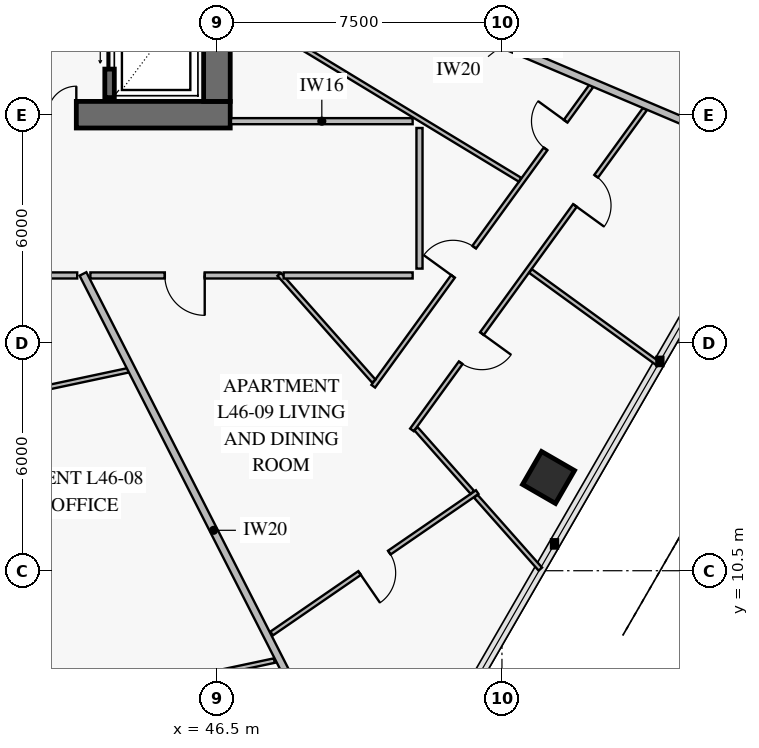
"""IFC4 building model, lengths in metres.
Left out: names, types, materials, properties, quantities, classifications, styles, units other than length and angle.
Written with IfcOpenShell. Run it as: python <this file> out.ifc"""

import sys

from ifc_helpers import new_model, si_unit, direction, frame, frame_2d, origin, origin_2d, place, context, subcontext, project, spatial, rectangle, extrude, element, fill, save


model = new_model("IFC4")
c1 = context("Model", 3, precision=1e-05, world=origin(), true_north=direction((0.0, 1.0)))
c2 = subcontext(c1, "Body", "Model", "MODEL_VIEW")
j1 = project(units=[si_unit("LENGTHUNIT", "METRE"), si_unit("PLANEANGLEUNIT", "RADIAN")], contexts=[c1])
p1 = place(None, origin())
s1 = spatial("IfcSite", under=j1, at=p1, CompositionType="ELEMENT")
p2 = place(p1, origin())
s2 = spatial("IfcBuilding", under=s1, at=p2, CompositionType="ELEMENT")
p3 = place(p2, frame((0.0, 0.0, 184.6)))
s3 = spatial("IfcBuildingStorey", under=s2, at=p3, CompositionType="ELEMENT", Elevation=184.6)
p4 = place(p3, frame((37.35, 22.5, 0.0), z_axis=(0.0, 0.0, 1.0), x_axis=(1.0, 0.0, 0.0)))
e1 = element("IfcWall", 1, at=p4, inside=s3, PredefinedType="SHEAR", context=c2, shape_type="SweptSolid", body=[
    extrude(rectangle(XDim=9.5, YDim=0.7, at=frame_2d((4.75, 0.0))), origin(), (0.0, 0.0, 1.0), 3.8),
])
p5 = place(p4, frame((3.95, 0.0, 0.0)))
e2 = element("IfcOpeningElement", 2, at=p5, cuts=e1, PredefinedType="OPENING", context=c2, shape_type="SweptSolid", body=[
    extrude(rectangle(XDim=1.5, YDim=2.15, at=frame_2d((0.75, 1.075))), frame((0.0, 0.362, 0.0), z_axis=(0.0, -1.0, 0.0), x_axis=(1.0, 0.0, 0.0)), (0.0, 0.0, 1.0), 0.724),
])
p6 = place(p3, frame((46.5, 22.85, 0.0), z_axis=(0.0, 0.0, 1.0), x_axis=(0.0, 1.0, 0.0)))
e3 = element("IfcWall", 3, at=p6, inside=s3, PredefinedType="SHEAR", context=c2, shape_type="SweptSolid", body=[
    extrude(rectangle(XDim=18.3, YDim=0.7, at=frame_2d((9.15, 0.0))), origin(), (0.0, 0.0, 1.0), 3.8),
])
p7 = place(p6, frame((8.9, 0.0, 0.0)))
e4 = element("IfcOpeningElement", 4, at=p7, cuts=e3, PredefinedType="OPENING", context=c2, shape_type="SweptSolid", body=[
    extrude(rectangle(XDim=1.1, YDim=2.15, at=frame_2d((0.55, 1.075))), frame((0.0, 0.362, 0.0), z_axis=(0.0, -1.0, 0.0), x_axis=(1.0, 0.0, 0.0)), (0.0, 0.0, 1.0), 0.724),
])
p8 = place(p3, frame((55.226, 12.953, 0.0), z_axis=(0.0, 0.0, 1.0), x_axis=(0.5, 0.866025403784, 0.0)))
e5 = element("IfcColumn", 5, at=p8, inside=s3, PredefinedType="COLUMN", context=c2, shape_type="SweptSolid", body=[
    extrude(rectangle(XDim=1.0, YDim=1.0, at=origin_2d()), origin(), (0.0, 0.0, 1.0), 3.55),
])
p9 = place(p3, frame((43.675, 22.95, 0.0), z_axis=(0.0, 0.0, 1.0), x_axis=(0.0, 1.0, 0.0)))
e6 = element("IfcWall", 6, at=p9, inside=s3, PredefinedType="SOLIDWALL", context=c2, shape_type="SweptSolid", body=[
    extrude(rectangle(XDim=8.2, YDim=0.25, at=frame_2d((4.1, 0.0))), origin(), (0.0, 0.0, 1.0), 3.8),
])
p10 = place(p9, frame((0.75, 0.0, 0.0)))
e7 = element("IfcOpeningElement", 7, at=p10, cuts=e6, PredefinedType="OPENING", context=c2, shape_type="SweptSolid", body=[
    extrude(rectangle(XDim=1.3, YDim=2.3, at=frame_2d((0.65, 1.15))), frame((0.0, 0.137, 0.0), z_axis=(0.0, -1.0, 0.0), x_axis=(1.0, 0.0, 0.0)), (0.0, 0.0, 1.0), 0.274),
])
p11 = place(p9, frame((3.7, 0.0, 0.0)))
e8 = element("IfcOpeningElement", 8, at=p11, cuts=e6, PredefinedType="OPENING", context=c2, shape_type="SweptSolid", body=[
    extrude(rectangle(XDim=1.3, YDim=2.3, at=frame_2d((0.65, 1.15))), frame((0.0, 0.137, 0.0), z_axis=(0.0, -1.0, 0.0), x_axis=(1.0, 0.0, 0.0)), (0.0, 0.0, 1.0), 0.274),
])
p12 = place(p9, frame((6.62, 0.0, 0.0)))
e9 = element("IfcOpeningElement", 9, at=p12, cuts=e6, PredefinedType="OPENING", context=c2, shape_type="SweptSolid", body=[
    extrude(rectangle(XDim=0.9, YDim=2.1, at=frame_2d((0.45, 1.05))), frame((0.0, 0.137, 0.0), z_axis=(0.0, -1.0, 0.0), x_axis=(1.0, 0.0, 0.0)), (0.0, 0.0, 1.0), 0.274),
])
p13 = place(p3, frame((39.902, 6.412, 0.0), z_axis=(0.0, 0.0, 1.0), x_axis=(0.978148894312, 0.207905604918, 0.0)))
e10 = element("IfcWall", 10, at=p13, inside=s3, PredefinedType="PARTITIONING", context=c2, shape_type="SweptSolid", body=[
    extrude(rectangle(XDim=8.289, YDim=0.12, at=frame_2d((4.145, 0.0))), origin(), (0.0, 0.0, 1.0), 2.87),
])
p14 = place(p13, frame((3.586, 0.0, 0.0)))
e11 = element("IfcOpeningElement", 11, at=p14, cuts=e10, PredefinedType="OPENING", context=c2, shape_type="SweptSolid", body=[
    extrude(rectangle(XDim=0.95, YDim=2.1, at=frame_2d((0.475, 1.05))), frame((0.0, 0.072, 0.0), z_axis=(0.0, -1.0, 0.0), x_axis=(1.0, 0.0, 0.0)), (0.0, 0.0, 1.0), 0.144),
])
p15 = place(p3, frame((47.94, 8.847, 0.0), z_axis=(0.0, 0.0, 1.0), x_axis=(0.823925822712, 0.566697660723, 0.0)))
e12 = element("IfcWall", 12, at=p15, inside=s3, PredefinedType="PARTITIONING", context=c2, shape_type="SweptSolid", body=[
    extrude(rectangle(XDim=6.566, YDim=0.12, at=frame_2d((3.283, 0.0))), origin(), (0.0, 0.0, 1.0), 2.87),
])
p16 = place(p15, frame((2.808, 0.0, 0.0)))
e13 = element("IfcOpeningElement", 13, at=p16, cuts=e12, PredefinedType="OPENING", context=c2, shape_type="SweptSolid", body=[
    extrude(rectangle(XDim=0.95, YDim=2.1, at=frame_2d((0.475, 1.05))), frame((0.0, 0.072, 0.0), z_axis=(0.0, -1.0, 0.0), x_axis=(1.0, 0.0, 0.0)), (0.0, 0.0, 1.0), 0.144),
])
p17 = place(p3, frame((50.613, 15.355, 0.0), z_axis=(0.0, 0.0, 1.0), x_axis=(0.587519111836, 0.809210289867, 0.0)))
e14 = element("IfcWall", 14, at=p17, inside=s3, PredefinedType="PARTITIONING", context=c2, shape_type="SweptSolid", body=[
    extrude(rectangle(XDim=9.768, YDim=0.12, at=frame_2d((4.884, 0.0))), origin(), (0.0, 0.0, 1.0), 2.9),
])
p18 = place(p17, frame((3.572, 0.0, 0.0)))
e15 = element("IfcOpeningElement", 15, at=p18, cuts=e14, PredefinedType="OPENING", context=c2, shape_type="SweptSolid", body=[
    extrude(rectangle(XDim=0.95, YDim=2.1, at=frame_2d((0.475, 1.05))), frame((0.0, 0.072, 0.0), z_axis=(0.0, -1.0, 0.0), x_axis=(1.0, 0.0, 0.0)), (0.0, 0.0, 1.0), 0.144),
])
p19 = place(p17, frame((7.719, 0.0, 0.0)))
e16 = element("IfcOpeningElement", 16, at=p19, cuts=e14, PredefinedType="OPENING", context=c2, shape_type="SweptSolid", body=[
    extrude(rectangle(XDim=0.9, YDim=2.1, at=frame_2d((0.45, 1.05))), frame((0.0, 0.072, 0.0), z_axis=(0.0, -1.0, 0.0), x_axis=(1.0, 0.0, 0.0)), (0.0, 0.0, 1.0), 0.144),
])
p20 = place(p3, frame((51.632, 14.205, 0.0), z_axis=(0.0, 0.0, 1.0), x_axis=(0.587503568884, 0.809221574446, 0.0)))
e17 = element("IfcWall", 17, at=p20, inside=s3, PredefinedType="PARTITIONING", context=c2, shape_type="SweptSolid", body=[
    extrude(rectangle(XDim=10.432, YDim=0.12, at=frame_2d((5.216, 0.0))), origin(), (0.0, 0.0, 1.0), 2.9),
])
p21 = place(p20, frame((2.183, 0.0, 0.0)))
e18 = element("IfcOpeningElement", 18, at=p21, cuts=e17, PredefinedType="OPENING", context=c2, shape_type="SweptSolid", body=[
    extrude(rectangle(XDim=0.95, YDim=2.1, at=frame_2d((0.475, 1.05))), frame((0.0, 0.072, 0.0), z_axis=(0.0, -1.0, 0.0), x_axis=(1.0, 0.0, 0.0)), (0.0, 0.0, 1.0), 0.144),
])
p22 = place(p20, frame((7.299, 0.0, 0.0)))
e19 = element("IfcOpeningElement", 19, at=p22, cuts=e17, PredefinedType="OPENING", context=c2, shape_type="SweptSolid", body=[
    extrude(rectangle(XDim=0.95, YDim=2.1, at=frame_2d((0.475, 1.05))), frame((0.0, 0.072, 0.0), z_axis=(0.0, -1.0, 0.0), x_axis=(1.0, 0.0, 0.0)), (0.0, 0.0, 1.0), 0.144),
])
p23 = place(p3, frame((43.17, 18.27, 0.0), z_axis=(0.0, 0.0, 1.0), x_axis=(1.0, 0.0, 0.0)))
e20 = element("IfcWall", 20, at=p23, inside=s3, PredefinedType="PARTITIONING", context=c2, shape_type="SweptSolid", body=[
    extrude(rectangle(XDim=4.968, YDim=0.16, at=frame_2d((2.484, 0.0))), origin(), (0.0, 0.0, 1.0), 3.55),
])
p24 = place(p23, frame((1.959, 0.0, 0.0)))
e21 = element("IfcOpeningElement", 21, at=p24, cuts=e20, PredefinedType="OPENING", context=c2, shape_type="SweptSolid", body=[
    extrude(rectangle(XDim=1.05, YDim=2.15, at=frame_2d((0.525, 1.075))), frame((0.0, 0.092, 0.0), z_axis=(0.0, -1.0, 0.0), x_axis=(1.0, 0.0, 0.0)), (0.0, 0.0, 1.0), 0.184),
])
p25 = place(p3, frame((38.674, 14.607, 0.0), z_axis=(0.0, 0.0, 1.0), x_axis=(0.978141487947, 0.207940447142, 0.0)))
e22 = element("IfcWall", 22, at=p25, inside=s3, PredefinedType="PARTITIONING", context=c2, shape_type="SweptSolid", body=[
    extrude(rectangle(XDim=5.647, YDim=0.12, at=frame_2d((2.824, 0.0))), origin(), (0.0, 0.0, 1.0), 2.9),
])
p26 = place(p3, frame((42.975, 18.31, 0.0), z_axis=(0.0, 0.0, 1.0), x_axis=(0.453997506489, -0.891002954037, 0.0)))
e23 = element("IfcWall", 23, at=p26, inside=s3, PredefinedType="PARTITIONING", context=c2, shape_type="SweptSolid", body=[
    extrude(rectangle(XDim=15.144, YDim=0.2, at=frame_2d((7.572, 0.0))), origin(), (0.0, 0.0, 1.0), 2.87),
])
p27 = place(p3, frame((46.858, 25.411, 0.0), z_axis=(0.0, 0.0, 1.0), x_axis=(0.854916867304, -0.518765023878, 0.0)))
e24 = element("IfcWall", 24, at=p27, inside=s3, PredefinedType="PARTITIONING", context=c2, shape_type="SweptSolid", body=[
    extrude(rectangle(XDim=8.909, YDim=0.12, at=frame_2d((4.455, 0.0))), origin(), (0.0, 0.0, 1.0), 3.15),
])
p28 = place(p3, frame((54.752, 18.386, 0.0), z_axis=(0.0, 0.0, 1.0), x_axis=(0.809234621537, -0.587485597531, 0.0)))
e25 = element("IfcWall", 25, at=p28, inside=s3, PredefinedType="PARTITIONING", context=c2, shape_type="SweptSolid", body=[
    extrude(rectangle(XDim=4.169, YDim=0.12, at=frame_2d((2.085, 0.0))), origin(), (0.0, 0.0, 1.0), 2.87),
])
p29 = place(p3, frame((48.138, 18.3, 0.0), z_axis=(0.0, 0.0, 1.0), x_axis=(0.663123743862, -0.748509786393, 0.0)))
e26 = element("IfcWall", 26, at=p29, inside=s3, PredefinedType="PARTITIONING", context=c2, shape_type="SweptSolid", body=[
    extrude(rectangle(XDim=3.754, YDim=0.12, at=frame_2d((1.877, 0.0))), origin(), (0.0, 0.0, 1.0), 3.55),
])
p30 = place(p3, frame((51.739, 14.236, 0.0), z_axis=(0.0, 0.0, 1.0), x_axis=(0.663176854864, -0.74846273065, 0.0)))
e27 = element("IfcWall", 27, at=p30, inside=s3, PredefinedType="PARTITIONING", context=c2, shape_type="SweptSolid", body=[
    extrude(rectangle(XDim=2.236, YDim=0.12, at=frame_2d((1.118, 0.0))), origin(), (0.0, 0.0, 1.0), 3.55),
])
p31 = place(p3, frame((53.312, 12.46, 0.0), z_axis=(0.0, 0.0, 1.0), x_axis=(0.663102409331, -0.748528686651, 0.0)))
e28 = element("IfcWall", 28, at=p31, inside=s3, PredefinedType="PARTITIONING", context=c2, shape_type="SweptSolid", body=[
    extrude(rectangle(XDim=2.561, YDim=0.12, at=frame_2d((1.28, 0.0))), origin(), (0.0, 0.0, 1.0), 2.87),
])
p32 = place(p3, frame((46.858, 27.391, 0.0), z_axis=(0.0, 0.0, 1.0), x_axis=(0.920508238271, -0.390723154261, 0.0)))
e29 = element("IfcWall", 29, at=p32, inside=s3, PredefinedType="PARTITIONING", context=c2, shape_type="SweptSolid", body=[
    extrude(rectangle(XDim=15.592, YDim=0.2, at=frame_2d((7.796, 0.0))), origin(), (0.0, 0.0, 1.0), 2.87),
])
p33 = place(p3, frame((38.126, 18.27, 0.0), z_axis=(0.0, 0.0, 1.0), x_axis=(1.0, 0.0, 0.0)))
e30 = element("IfcWall", 30, at=p33, inside=s3, PredefinedType="PARTITIONING", context=c2, shape_type="SweptSolid", body=[
    extrude(rectangle(XDim=4.698, YDim=0.16, at=frame_2d((2.349, 0.0))), origin(), (0.0, 0.0, 1.0), 2.9),
])
p34 = place(p3, frame((51.65, 22.33, 0.0), z_axis=(0.0, 0.0, 1.0), x_axis=(-1.0, 0.0, 0.0)))
e31 = element("IfcWall", 31, at=p34, inside=s3, PredefinedType="PARTITIONING", context=c2, shape_type="SweptSolid", body=[
    extrude(rectangle(XDim=4.78, YDim=0.16, at=frame_2d((2.39, 0.0))), origin(), (0.0, 0.0, 1.0), 3.55),
])
p35 = place(p3, frame((51.83, 18.45, 0.0), z_axis=(0.0, 0.0, 1.0), x_axis=(0.0, 1.0, 0.0)))
e32 = element("IfcWall", 32, at=p35, inside=s3, PredefinedType="PARTITIONING", context=c2, shape_type="SweptSolid", body=[
    extrude(rectangle(XDim=3.7, YDim=0.16, at=frame_2d((1.85, 0.0))), origin(), (0.0, 0.0, 1.0), 3.15),
])
p36 = place(p3, frame((48.255, 18.27, 0.0), z_axis=(0.0, 0.0, 1.0), x_axis=(1.0, 0.0, 0.0)))
e33 = element("IfcWall", 33, at=p36, inside=s3, PredefinedType="PARTITIONING", context=c2, shape_type="SweptSolid", body=[
    extrude(rectangle(XDim=3.395, YDim=0.16, at=frame_2d((1.697, 0.0))), origin(), (0.0, 0.0, 1.0), 2.9),
])
p37 = place(p5, origin())
e34 = element("IfcDoor", 34, at=p37, inside=s3, OperationType="DOUBLE_DOOR_SINGLE_SWING", PredefinedType="DOOR", context=c2, shape_type="SweptSolid", body=[
    extrude(rectangle(XDim=1.5, YDim=2.15, at=frame_2d((0.75, 1.075))), frame((0.0, 0.025, 0.0), z_axis=(0.0, -1.0, 0.0), x_axis=(1.0, 0.0, 0.0)), (0.0, 0.0, 1.0), 0.05),
])
fill(e2, e34)
p38 = place(p10, origin())
e35 = element("IfcDoor", 35, at=p38, inside=s3, OperationType="DOUBLE_DOOR_SLIDING", PredefinedType="DOOR", context=c2, shape_type="SweptSolid", body=[
    extrude(rectangle(XDim=1.3, YDim=2.3, at=frame_2d((0.65, 1.15))), frame((0.0, 0.025, 0.0), z_axis=(0.0, -1.0, 0.0), x_axis=(1.0, 0.0, 0.0)), (0.0, 0.0, 1.0), 0.05),
])
fill(e7, e35)
p39 = place(p16, frame((0.95, 0.0, 0.0), z_axis=(0.0, 0.0, 1.0), x_axis=(-1.0, 0.0, 0.0)))
e36 = element("IfcDoor", 36, at=p39, inside=s3, OperationType="SINGLE_SWING_RIGHT", PredefinedType="DOOR", context=c2, shape_type="SweptSolid", body=[
    extrude(rectangle(XDim=0.95, YDim=2.1, at=frame_2d((0.475, 1.05))), frame((0.0, 0.025, 0.0), z_axis=(0.0, -1.0, 0.0), x_axis=(1.0, 0.0, 0.0)), (0.0, 0.0, 1.0), 0.05),
])
fill(e13, e36)
p40 = place(p18, origin())
e37 = element("IfcDoor", 37, at=p40, inside=s3, OperationType="SINGLE_SWING_LEFT", PredefinedType="DOOR", context=c2, shape_type="SweptSolid", body=[
    extrude(rectangle(XDim=0.95, YDim=2.1, at=frame_2d((0.475, 1.05))), frame((0.0, 0.025, 0.0), z_axis=(0.0, -1.0, 0.0), x_axis=(1.0, 0.0, 0.0)), (0.0, 0.0, 1.0), 0.05),
])
fill(e15, e37)
p41 = place(p19, origin())
e38 = element("IfcDoor", 38, at=p41, inside=s3, OperationType="SINGLE_SWING_RIGHT", PredefinedType="DOOR", context=c2, shape_type="SweptSolid", body=[
    extrude(rectangle(XDim=0.9, YDim=2.1, at=frame_2d((0.45, 1.05))), frame((0.0, 0.025, 0.0), z_axis=(0.0, -1.0, 0.0), x_axis=(1.0, 0.0, 0.0)), (0.0, 0.0, 1.0), 0.05),
])
fill(e16, e38)
p42 = place(p21, frame((0.95, 0.0, 0.0), z_axis=(0.0, 0.0, 1.0), x_axis=(-1.0, 0.0, 0.0)))
e39 = element("IfcDoor", 39, at=p42, inside=s3, OperationType="SINGLE_SWING_LEFT", PredefinedType="DOOR", context=c2, shape_type="SweptSolid", body=[
    extrude(rectangle(XDim=0.95, YDim=2.1, at=frame_2d((0.475, 1.05))), frame((0.0, 0.025, 0.0), z_axis=(0.0, -1.0, 0.0), x_axis=(1.0, 0.0, 0.0)), (0.0, 0.0, 1.0), 0.05),
])
fill(e18, e39)
p43 = place(p22, frame((0.95, 0.0, 0.0), z_axis=(0.0, 0.0, 1.0), x_axis=(-1.0, 0.0, 0.0)))
e40 = element("IfcDoor", 40, at=p43, inside=s3, OperationType="SINGLE_SWING_RIGHT", PredefinedType="DOOR", context=c2, shape_type="SweptSolid", body=[
    extrude(rectangle(XDim=0.95, YDim=2.1, at=frame_2d((0.475, 1.05))), frame((0.0, 0.025, 0.0), z_axis=(0.0, -1.0, 0.0), x_axis=(1.0, 0.0, 0.0)), (0.0, 0.0, 1.0), 0.05),
])
fill(e19, e40)
p44 = place(p24, frame((1.05, 0.0, 0.0), z_axis=(0.0, 0.0, 1.0), x_axis=(-1.0, 0.0, 0.0)))
e41 = element("IfcDoor", 41, at=p44, inside=s3, OperationType="SINGLE_SWING_LEFT", PredefinedType="DOOR", context=c2, shape_type="SweptSolid", body=[
    extrude(rectangle(XDim=1.05, YDim=2.15, at=frame_2d((0.525, 1.075))), frame((0.0, 0.025, 0.0), z_axis=(0.0, -1.0, 0.0), x_axis=(1.0, 0.0, 0.0)), (0.0, 0.0, 1.0), 0.05),
])
fill(e21, e41)
save(model, sys.argv[1])
